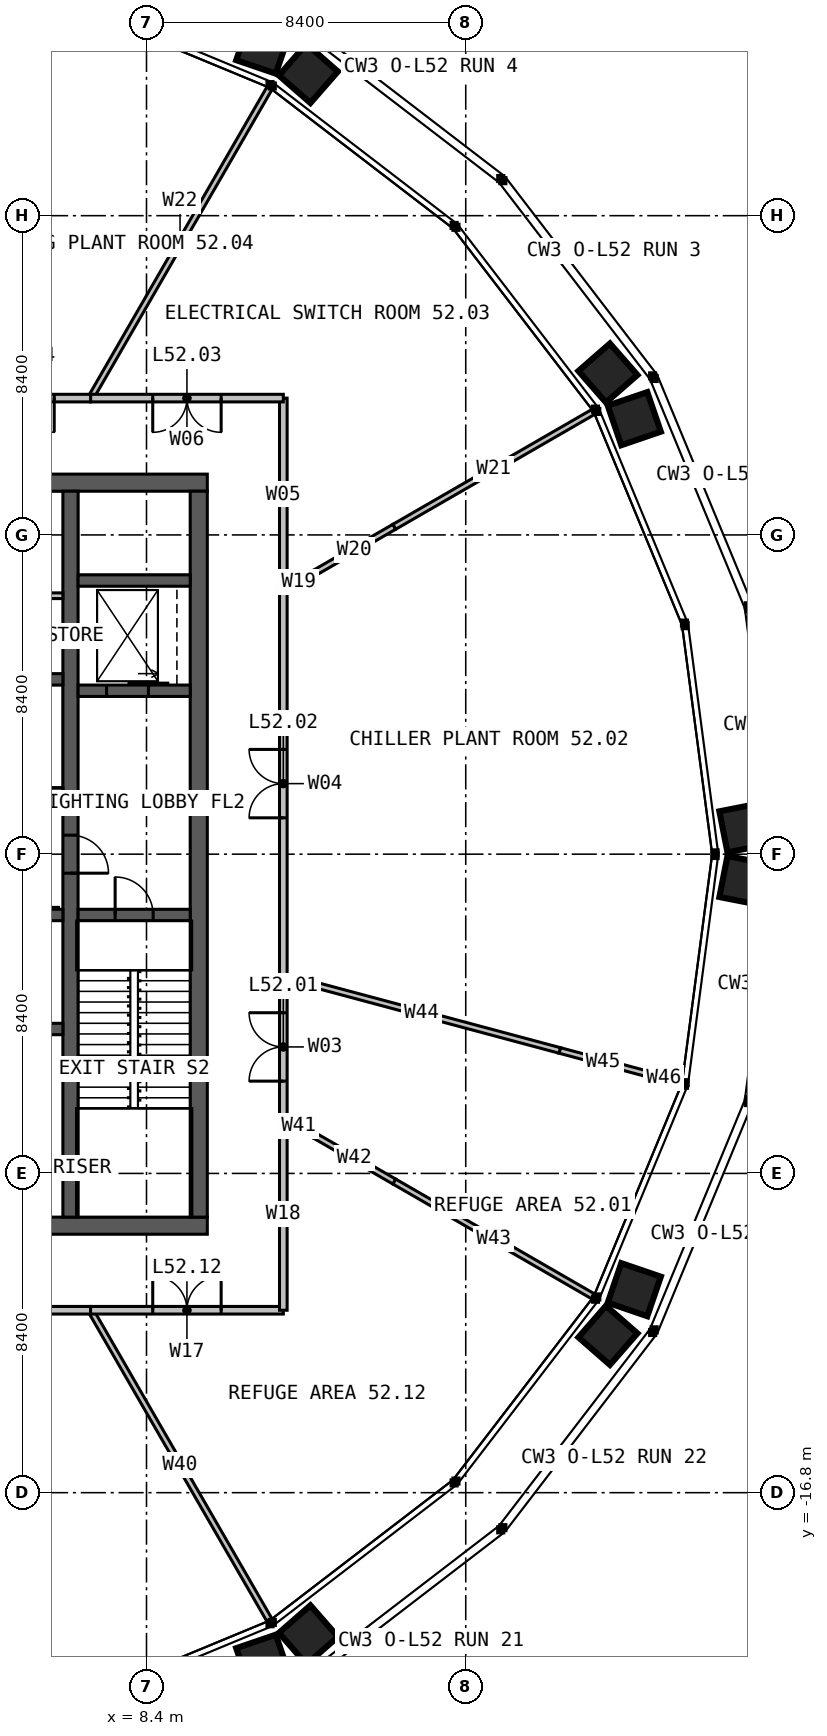
"""IFC4 building model, lengths in metres.
Left out: names, types, materials, properties, quantities, classifications, styles, units other than length and angle.
Written with IfcOpenShell. Run it as: python <this file> out.ifc"""

import sys

from ifc_helpers import new_model, si_unit, direction, frame, frame_2d, origin, place, context, subcontext, project, spatial, rectangle, extrude, element, fill, save


model = new_model("IFC4")
c1 = context("Model", 3, precision=1e-05, world=origin(), true_north=direction((0.0, 1.0)))
c2 = subcontext(c1, "Body", "Model", "MODEL_VIEW")
j1 = project(units=[si_unit("LENGTHUNIT", "METRE"), si_unit("PLANEANGLEUNIT", "RADIAN")], contexts=[c1])
p1 = place(None, origin())
s1 = spatial("IfcSite", under=j1, at=p1, CompositionType="ELEMENT")
p2 = place(p1, origin())
s2 = spatial("IfcBuilding", under=s1, at=p2, CompositionType="ELEMENT")
p3 = place(p2, frame((0.0, 0.0, 215.0)))
s3 = spatial("IfcBuildingStorey", under=s2, at=p3, CompositionType="ELEMENT", Elevation=215.0)
p4 = place(p3, frame((-10.0, 9.775, 0.0), z_axis=(0.0, 0.0, 1.0), x_axis=(1.0, 0.0, 0.0)))
e1 = element("IfcWall", 1, at=p4, inside=s3, PredefinedType="SOLIDWALL", context=c2, shape_type="SweptSolid", body=[
    extrude(rectangle(XDim=20.0, YDim=0.45, at=frame_2d((10.0, 0.0))), origin(), (0.0, 0.0, 1.0), 5.0),
])
p5 = place(p4, frame((9.4, 0.0, 0.0)))
e2 = element("IfcOpeningElement", 2, at=p5, cuts=e1, PredefinedType="OPENING", context=c2, shape_type="SweptSolid", body=[
    extrude(rectangle(XDim=1.2, YDim=2.2, at=frame_2d((0.6, 1.1))), frame((0.0, 0.235, 0.0), z_axis=(0.0, -1.0, 0.0), x_axis=(1.0, 0.0, 0.0)), (0.0, 0.0, 1.0), 0.47),
])
p6 = place(p3, frame((10.0, -9.775, 0.0), z_axis=(0.0, 0.0, 1.0), x_axis=(-1.0, 0.0, 0.0)))
e3 = element("IfcWall", 3, at=p6, inside=s3, PredefinedType="SOLIDWALL", context=c2, shape_type="SweptSolid", body=[
    extrude(rectangle(XDim=20.0, YDim=0.45, at=frame_2d((10.0, 0.0))), origin(), (0.0, 0.0, 1.0), 5.0),
])
p7 = place(p6, frame((6.875, 0.0, 0.0)))
e4 = element("IfcOpeningElement", 4, at=p7, cuts=e3, PredefinedType="OPENING", context=c2, shape_type="SweptSolid", body=[
    extrude(rectangle(XDim=1.2, YDim=2.2, at=frame_2d((0.6, 1.1))), frame((0.0, 0.235, 0.0), z_axis=(0.0, -1.0, 0.0), x_axis=(1.0, 0.0, 0.0)), (0.0, 0.0, 1.0), 0.47),
])
p8 = place(p3, frame((9.775, -9.55, 0.0), z_axis=(0.0, 0.0, 1.0), x_axis=(0.0, 1.0, 0.0)))
e5 = element("IfcWall", 5, at=p8, inside=s3, PredefinedType="SOLIDWALL", context=c2, shape_type="SweptSolid", body=[
    extrude(rectangle(XDim=19.1, YDim=0.45, at=frame_2d((9.55, 0.0))), origin(), (0.0, 0.0, 1.0), 5.0),
])
p9 = place(p3, frame((6.4, 9.55, 0.0), z_axis=(0.0, 0.0, 1.0), x_axis=(0.0, -1.0, 0.0)))
e6 = element("IfcWall", 6, at=p9, inside=s3, PredefinedType="SOLIDWALL", context=c2, shape_type="SweptSolid", body=[
    extrude(rectangle(XDim=19.1, YDim=0.4, at=frame_2d((9.55, 0.0))), origin(), (0.0, 0.0, 1.0), 5.0),
])
p10 = place(p9, frame((9.05, 0.0, 0.0)))
e7 = element("IfcOpeningElement", 7, at=p10, cuts=e6, PredefinedType="OPENING", context=c2, shape_type="SweptSolid", body=[
    extrude(rectangle(XDim=1.0, YDim=2.2, at=frame_2d((0.5, 1.1))), frame((0.0, 0.21, 0.0), z_axis=(0.0, -1.0, 0.0), x_axis=(1.0, 0.0, 0.0)), (0.0, 0.0, 1.0), 0.42),
])
for number, where, z_axis, x_axis in (
    (8, (1.35, 1.6, 0.0), (0.0, 0.0, 1.0), (1.0, 0.0, 0.0)),
    (9, (1.35, 4.6, 0.0), (0.0, 0.0, 1.0), (1.0, 0.0, 0.0)),
):
    element("IfcWall", number, at=place(p3, frame(where, z_axis=z_axis, x_axis=x_axis)), inside=s3, PredefinedType="SOLIDWALL", context=c2, shape_type="SweptSolid", body=[
        extrude(rectangle(XDim=4.85, YDim=0.3, at=frame_2d((2.425, 0.0))), origin(), (0.0, 0.0, 1.0), 5.0),
    ])
p11 = place(p3, frame((3.85, -1.6, 0.0), z_axis=(0.0, 0.0, 1.0), x_axis=(1.0, 0.0, 0.0)))
e10 = element("IfcWall", 10, at=p11, inside=s3, PredefinedType="SOLIDWALL", context=c2, shape_type="SweptSolid", body=[
    extrude(rectangle(XDim=2.35, YDim=0.3, at=frame_2d((1.175, 0.0))), origin(), (0.0, 0.0, 1.0), 5.0),
])
p12 = place(p11, frame((0.625, 0.0, 0.0)))
e11 = element("IfcOpeningElement", 11, at=p12, cuts=e10, PredefinedType="OPENING", context=c2, shape_type="SweptSolid", body=[
    extrude(rectangle(XDim=1.1, YDim=2.2, at=frame_2d((0.55, 1.1))), frame((0.0, 0.16, 0.0), z_axis=(0.0, -1.0, 0.0), x_axis=(1.0, 0.0, 0.0)), (0.0, 0.0, 1.0), 0.32),
])
p13 = place(p3, frame((3.85, -4.6, 0.0), z_axis=(0.0, 0.0, 1.0), x_axis=(1.0, 0.0, 0.0)))
e12 = element("IfcWall", 12, at=p13, inside=s3, PredefinedType="SOLIDWALL", context=c2, shape_type="SweptSolid", body=[
    extrude(rectangle(XDim=2.35, YDim=0.3, at=frame_2d((1.175, 0.0))), origin(), (0.0, 0.0, 1.0), 5.0),
])
p14 = place(p3, frame((6.6, -1.6, 0.0), z_axis=(0.0, 0.0, 1.0), x_axis=(1.0, 0.0, 0.0)))
e13 = element("IfcWall", 13, at=p14, inside=s3, PredefinedType="SOLIDWALL", context=c2, shape_type="SweptSolid", body=[
    extrude(rectangle(XDim=2.95, YDim=0.3, at=frame_2d((1.475, 0.0))), origin(), (0.0, 0.0, 1.0), 5.0),
])
p15 = place(p14, frame((0.975, 0.0, 0.0)))
e14 = element("IfcOpeningElement", 14, at=p15, cuts=e13, PredefinedType="OPENING", context=c2, shape_type="SweptSolid", body=[
    extrude(rectangle(XDim=1.0, YDim=2.2, at=frame_2d((0.5, 1.1))), frame((0.0, 0.16, 0.0), z_axis=(0.0, -1.0, 0.0), x_axis=(1.0, 0.0, 0.0)), (0.0, 0.0, 1.0), 0.32),
])
p16 = place(p3, frame((6.6, 4.3, 0.0), z_axis=(0.0, 0.0, 1.0), x_axis=(1.0, 0.0, 0.0)))
e15 = element("IfcWall", 15, at=p16, inside=s3, PredefinedType="SOLIDWALL", context=c2, shape_type="SweptSolid", body=[
    extrude(rectangle(XDim=2.95, YDim=0.3, at=frame_2d((1.475, 0.0))), origin(), (0.0, 0.0, 1.0), 5.0),
])
p17 = place(p16, frame((0.75, 0.0, 0.0)))
e16 = element("IfcOpeningElement", 16, at=p17, cuts=e15, PredefinedType="OPENING", context=c2, shape_type="SweptSolid", body=[
    extrude(rectangle(XDim=1.1, YDim=2.2, at=frame_2d((0.55, 1.1))), frame((0.0, 0.16, 0.0), z_axis=(0.0, -1.0, 0.0), x_axis=(1.0, 0.0, 0.0)), (0.0, 0.0, 1.0), 0.32),
])
p18 = place(p3, frame((6.6, 7.2, 0.0), z_axis=(0.0, 0.0, 1.0), x_axis=(1.0, 0.0, 0.0)))
e17 = element("IfcWall", 17, at=p18, inside=s3, PredefinedType="SOLIDWALL", context=c2, shape_type="SweptSolid", body=[
    extrude(rectangle(XDim=2.95, YDim=0.3, at=frame_2d((1.475, 0.0))), origin(), (0.0, 0.0, 1.0), 5.0),
])
p19 = place(p3, frame((1.35, 6.8, 0.0), z_axis=(0.0, 0.0, 1.0), x_axis=(1.0, 0.0, 0.0)))
e18 = element("IfcWall", 18, at=p19, inside=s3, PredefinedType="PARTITIONING", context=c2, shape_type="SweptSolid", body=[
    extrude(rectangle(XDim=4.85, YDim=0.15, at=frame_2d((2.425, 0.0))), origin(), (0.0, 0.0, 1.0), 4.75),
])
p20 = place(p19, frame((3.15, 0.0, 0.0)))
e19 = element("IfcOpeningElement", 19, at=p20, cuts=e18, PredefinedType="OPENING", context=c2, shape_type="SweptSolid", body=[
    extrude(rectangle(XDim=0.9, YDim=2.2, at=frame_2d((0.45, 1.1))), frame((0.0, 0.085, 0.0), z_axis=(0.0, -1.0, 0.0), x_axis=(1.0, 0.0, 0.0)), (0.0, 0.0, 1.0), 0.17),
])
p21 = place(p3, frame((12.0, -6.928, 0.0), z_axis=(0.0, 0.0, 1.0), x_axis=(0.866042712228, -0.499970019698, 0.0)))
e20 = element("IfcWall", 20, at=p21, inside=s3, PredefinedType="PARTITIONING", context=c2, shape_type="SweptSolid", body=[
    extrude(rectangle(XDim=0.939, YDim=0.15, at=frame_2d((0.469, 0.0))), origin(), (0.0, 0.0, 1.0), 4.8),
])
p22 = place(p3, frame((12.813, -7.398, 0.0), z_axis=(0.0, 0.0, 1.0), x_axis=(0.86601855109, -0.500011869027, 0.0)))
e21 = element("IfcWall", 21, at=p22, inside=s3, PredefinedType="PARTITIONING", context=c2, shape_type="SweptSolid", body=[
    extrude(rectangle(XDim=2.434, YDim=0.15, at=frame_2d((1.217, 0.0))), origin(), (0.0, 0.0, 1.0), 3.79),
])
p23 = place(p3, frame((14.921, -8.615, 0.0), z_axis=(0.0, 0.0, 1.0), x_axis=(0.866017437, -0.500013798622, 0.0)))
e22 = element("IfcWall", 22, at=p23, inside=s3, PredefinedType="PARTITIONING", context=c2, shape_type="SweptSolid", body=[
    extrude(rectangle(XDim=6.045, YDim=0.15, at=frame_2d((3.022, 0.0))), origin(), (0.0, 0.0, 1.0), 4.8),
])
p24 = place(p3, frame((12.0, -3.215, 0.0), z_axis=(0.0, 0.0, 1.0), x_axis=(0.965923894696, -0.258826253797, 0.0)))
e23 = element("IfcWall", 23, at=p24, inside=s3, PredefinedType="PARTITIONING", context=c2, shape_type="SweptSolid", body=[
    extrude(rectangle(XDim=7.534, YDim=0.15, at=frame_2d((3.767, 0.0))), origin(), (0.0, 0.0, 1.0), 4.8),
])
p25 = place(p3, frame((19.277, -5.165, 0.0), z_axis=(0.0, 0.0, 1.0), x_axis=(0.965936478183, -0.258779288421, 0.0)))
e24 = element("IfcWall", 24, at=p25, inside=s3, PredefinedType="PARTITIONING", context=c2, shape_type="SweptSolid", body=[
    extrude(rectangle(XDim=2.354, YDim=0.15, at=frame_2d((1.177, 0.0))), origin(), (0.0, 0.0, 1.0), 3.79),
])
p26 = place(p3, frame((21.551, -5.774, 0.0), z_axis=(0.0, 0.0, 1.0), x_axis=(0.965872225937, -0.25901900155, 0.0)))
e25 = element("IfcWall", 25, at=p26, inside=s3, PredefinedType="PARTITIONING", context=c2, shape_type="SweptSolid", body=[
    extrude(rectangle(XDim=0.963, YDim=0.15, at=frame_2d((0.482, 0.0))), origin(), (0.0, 0.0, 1.0), 4.8),
])
p27 = place(p3, frame((12.0, 6.928, 0.0), z_axis=(0.0, 0.0, 1.0), x_axis=(0.866042712228, 0.499970019698, 0.0)))
e26 = element("IfcWall", 26, at=p27, inside=s3, PredefinedType="PARTITIONING", context=c2, shape_type="SweptSolid", body=[
    extrude(rectangle(XDim=0.939, YDim=0.15, at=frame_2d((0.469, 0.0))), origin(), (0.0, 0.0, 1.0), 4.8),
])
p28 = place(p3, frame((12.813, 7.398, 0.0), z_axis=(0.0, 0.0, 1.0), x_axis=(0.86601855109, 0.500011869027, 0.0)))
e27 = element("IfcWall", 27, at=p28, inside=s3, PredefinedType="PARTITIONING", context=c2, shape_type="SweptSolid", body=[
    extrude(rectangle(XDim=2.434, YDim=0.15, at=frame_2d((1.217, 0.0))), origin(), (0.0, 0.0, 1.0), 3.79),
])
p29 = place(p3, frame((14.921, 8.615, 0.0), z_axis=(0.0, 0.0, 1.0), x_axis=(0.866017437, 0.500013798622, 0.0)))
e28 = element("IfcWall", 28, at=p29, inside=s3, PredefinedType="PARTITIONING", context=c2, shape_type="SweptSolid", body=[
    extrude(rectangle(XDim=6.045, YDim=0.15, at=frame_2d((3.022, 0.0))), origin(), (0.0, 0.0, 1.0), 4.8),
])
for number, where, z_axis, x_axis in (
    (29, (6.928, 12.0, 0.0), (0.0, 0.0, 1.0), (0.5, 0.866, 0.0)),
    (30, (6.928, -12.0, 0.0), (0.0, 0.0, 1.0), (0.5, -0.866, 0.0)),
):
    element("IfcWall", number, at=place(p3, frame(where, z_axis=z_axis, x_axis=x_axis)), inside=s3, PredefinedType="PARTITIONING", context=c2, shape_type="SweptSolid", body=[
        extrude(rectangle(XDim=9.418, YDim=0.15, at=frame_2d((4.709, 0.0))), origin(), (0.0, 0.0, 1.0), 4.8),
    ])
p30 = place(p3, frame((12.0, -6.928, 0.0), z_axis=(0.0, 0.0, 1.0), x_axis=(0.0, 1.0, 0.0)))
e31 = element("IfcWall", 31, at=p30, inside=s3, PredefinedType="PARTITIONING", context=c2, shape_type="SweptSolid", body=[
    extrude(rectangle(XDim=3.713, YDim=0.2, at=frame_2d((1.856, 0.0))), origin(), (0.0, 0.0, 1.0), 4.8),
])
p31 = place(p30, frame((0.956, 0.0, 0.0)))
e32 = element("IfcOpeningElement", 32, at=p31, cuts=e31, PredefinedType="OPENING", context=c2, shape_type="SweptSolid", body=[
    extrude(rectangle(XDim=1.8, YDim=2.2, at=frame_2d((0.9, 1.1))), frame((0.0, 0.11, 0.0), z_axis=(0.0, -1.0, 0.0), x_axis=(1.0, 0.0, 0.0)), (0.0, 0.0, 1.0), 0.22),
])
p32 = place(p3, frame((12.0, -3.215, 0.0), z_axis=(0.0, 0.0, 1.0), x_axis=(0.0, 1.0, 0.0)))
e33 = element("IfcWall", 33, at=p32, inside=s3, PredefinedType="PARTITIONING", context=c2, shape_type="SweptSolid", body=[
    extrude(rectangle(XDim=10.144, YDim=0.2, at=frame_2d((5.072, 0.0))), origin(), (0.0, 0.0, 1.0), 4.8),
])
p33 = place(p32, frame((4.172, 0.0, 0.0)))
e34 = element("IfcOpeningElement", 34, at=p33, cuts=e33, PredefinedType="OPENING", context=c2, shape_type="SweptSolid", body=[
    extrude(rectangle(XDim=1.8, YDim=2.2, at=frame_2d((0.9, 1.1))), frame((0.0, 0.11, 0.0), z_axis=(0.0, -1.0, 0.0), x_axis=(1.0, 0.0, 0.0)), (0.0, 0.0, 1.0), 0.22),
])
p34 = place(p3, frame((12.0, 6.928, 0.0), z_axis=(0.0, 0.0, 1.0), x_axis=(0.0, 1.0, 0.0)))
e35 = element("IfcWall", 35, at=p34, inside=s3, PredefinedType="PARTITIONING", context=c2, shape_type="SweptSolid", body=[
    extrude(rectangle(XDim=5.072, YDim=0.2, at=frame_2d((2.536, 0.0))), origin(), (0.0, 0.0, 1.0), 4.8),
])
p35 = place(p3, frame((12.0, 12.0, 0.0), z_axis=(0.0, 0.0, 1.0), x_axis=(-1.0, 0.0, 0.0)))
e36 = element("IfcWall", 36, at=p35, inside=s3, PredefinedType="PARTITIONING", context=c2, shape_type="SweptSolid", body=[
    extrude(rectangle(XDim=5.072, YDim=0.2, at=frame_2d((2.536, 0.0))), origin(), (0.0, 0.0, 1.0), 4.8),
])
p36 = place(p35, frame((1.636, 0.0, 0.0)))
e37 = element("IfcOpeningElement", 37, at=p36, cuts=e36, PredefinedType="OPENING", context=c2, shape_type="SweptSolid", body=[
    extrude(rectangle(XDim=1.8, YDim=2.2, at=frame_2d((0.9, 1.1))), frame((0.0, 0.11, 0.0), z_axis=(0.0, -1.0, 0.0), x_axis=(1.0, 0.0, 0.0)), (0.0, 0.0, 1.0), 0.22),
])
p37 = place(p3, frame((6.928, 12.0, 0.0), z_axis=(0.0, 0.0, 1.0), x_axis=(-1.0, 0.0, 0.0)))
e38 = element("IfcWall", 38, at=p37, inside=s3, PredefinedType="PARTITIONING", context=c2, shape_type="SweptSolid", body=[
    extrude(rectangle(XDim=3.713, YDim=0.2, at=frame_2d((1.856, 0.0))), origin(), (0.0, 0.0, 1.0), 4.8),
])
p38 = place(p37, frame((0.956, 0.0, 0.0)))
e39 = element("IfcOpeningElement", 39, at=p38, cuts=e38, PredefinedType="OPENING", context=c2, shape_type="SweptSolid", body=[
    extrude(rectangle(XDim=1.8, YDim=2.2, at=frame_2d((0.9, 1.1))), frame((0.0, 0.11, 0.0), z_axis=(0.0, -1.0, 0.0), x_axis=(1.0, 0.0, 0.0)), (0.0, 0.0, 1.0), 0.22),
])
p39 = place(p3, frame((-3.215, -12.0, 0.0), z_axis=(0.0, 0.0, 1.0), x_axis=(1.0, 0.0, 0.0)))
e40 = element("IfcWall", 40, at=p39, inside=s3, PredefinedType="PARTITIONING", context=c2, shape_type="SweptSolid", body=[
    extrude(rectangle(XDim=10.144, YDim=0.2, at=frame_2d((5.072, 0.0))), origin(), (0.0, 0.0, 1.0), 4.8),
])
p40 = place(p39, frame((4.172, 0.0, 0.0)))
e41 = element("IfcOpeningElement", 41, at=p40, cuts=e40, PredefinedType="OPENING", context=c2, shape_type="SweptSolid", body=[
    extrude(rectangle(XDim=1.8, YDim=2.2, at=frame_2d((0.9, 1.1))), frame((0.0, 0.11, 0.0), z_axis=(0.0, -1.0, 0.0), x_axis=(1.0, 0.0, 0.0)), (0.0, 0.0, 1.0), 0.22),
])
p41 = place(p3, frame((6.928, -12.0, 0.0), z_axis=(0.0, 0.0, 1.0), x_axis=(1.0, 0.0, 0.0)))
e42 = element("IfcWall", 42, at=p41, inside=s3, PredefinedType="PARTITIONING", context=c2, shape_type="SweptSolid", body=[
    extrude(rectangle(XDim=5.072, YDim=0.2, at=frame_2d((2.536, 0.0))), origin(), (0.0, 0.0, 1.0), 4.8),
])
p42 = place(p41, frame((1.636, 0.0, 0.0)))
e43 = element("IfcOpeningElement", 43, at=p42, cuts=e42, PredefinedType="OPENING", context=c2, shape_type="SweptSolid", body=[
    extrude(rectangle(XDim=1.8, YDim=2.2, at=frame_2d((0.9, 1.1))), frame((0.0, 0.11, 0.0), z_axis=(0.0, -1.0, 0.0), x_axis=(1.0, 0.0, 0.0)), (0.0, 0.0, 1.0), 0.22),
])
p43 = place(p3, frame((12.0, -12.0, 0.0), z_axis=(0.0, 0.0, 1.0), x_axis=(0.0, 1.0, 0.0)))
e44 = element("IfcWall", 44, at=p43, inside=s3, PredefinedType="PARTITIONING", context=c2, shape_type="SweptSolid", body=[
    extrude(rectangle(XDim=5.072, YDim=0.2, at=frame_2d((2.536, 0.0))), origin(), (0.0, 0.0, 1.0), 4.8),
])
p44 = place(p10, origin())
e45 = element("IfcDoor", 45, at=p44, inside=s3, OperationType="SINGLE_SWING_RIGHT", PredefinedType="DOOR", context=c2, shape_type="SweptSolid", body=[
    extrude(rectangle(XDim=1.0, YDim=2.2, at=frame_2d((0.5, 1.1))), frame((0.0, 0.025, 0.0), z_axis=(0.0, -1.0, 0.0), x_axis=(1.0, 0.0, 0.0)), (0.0, 0.0, 1.0), 0.05),
])
fill(e7, e45)
p45 = place(p15, origin())
e46 = element("IfcDoor", 46, at=p45, inside=s3, OperationType="SINGLE_SWING_LEFT", PredefinedType="DOOR", context=c2, shape_type="SweptSolid", body=[
    extrude(rectangle(XDim=1.0, YDim=2.2, at=frame_2d((0.5, 1.1))), frame((0.0, 0.025, 0.0), z_axis=(0.0, -1.0, 0.0), x_axis=(1.0, 0.0, 0.0)), (0.0, 0.0, 1.0), 0.05),
])
fill(e14, e46)
p46 = place(p17, origin())
e47 = element("IfcDoor", 47, at=p46, inside=s3, OperationType="SLIDING_TO_LEFT", PredefinedType="DOOR", context=c2, shape_type="SweptSolid", body=[
    extrude(rectangle(XDim=1.1, YDim=2.2, at=frame_2d((0.55, 1.1))), frame((0.0, 0.025, 0.0), z_axis=(0.0, -1.0, 0.0), x_axis=(1.0, 0.0, 0.0)), (0.0, 0.0, 1.0), 0.05),
])
fill(e16, e47)
p47 = place(p31, origin())
e48 = element("IfcDoor", 48, at=p47, inside=s3, OperationType="DOUBLE_DOOR_SINGLE_SWING", PredefinedType="DOOR", context=c2, shape_type="SweptSolid", body=[
    extrude(rectangle(XDim=1.8, YDim=2.2, at=frame_2d((0.9, 1.1))), frame((0.0, 0.025, 0.0), z_axis=(0.0, -1.0, 0.0), x_axis=(1.0, 0.0, 0.0)), (0.0, 0.0, 1.0), 0.05),
])
fill(e32, e48)
p48 = place(p33, origin())
e49 = element("IfcDoor", 49, at=p48, inside=s3, OperationType="DOUBLE_DOOR_SINGLE_SWING", PredefinedType="DOOR", context=c2, shape_type="SweptSolid", body=[
    extrude(rectangle(XDim=1.8, YDim=2.2, at=frame_2d((0.9, 1.1))), frame((0.0, 0.025, 0.0), z_axis=(0.0, -1.0, 0.0), x_axis=(1.0, 0.0, 0.0)), (0.0, 0.0, 1.0), 0.05),
])
fill(e34, e49)
p49 = place(p36, origin())
e50 = element("IfcDoor", 50, at=p49, inside=s3, OperationType="DOUBLE_DOOR_SINGLE_SWING", PredefinedType="DOOR", context=c2, shape_type="SweptSolid", body=[
    extrude(rectangle(XDim=1.8, YDim=2.2, at=frame_2d((0.9, 1.1))), frame((0.0, 0.025, 0.0), z_axis=(0.0, -1.0, 0.0), x_axis=(1.0, 0.0, 0.0)), (0.0, 0.0, 1.0), 0.05),
])
fill(e37, e50)
p50 = place(p38, origin())
e51 = element("IfcDoor", 51, at=p50, inside=s3, OperationType="DOUBLE_DOOR_SINGLE_SWING", PredefinedType="DOOR", context=c2, shape_type="SweptSolid", body=[
    extrude(rectangle(XDim=1.8, YDim=2.2, at=frame_2d((0.9, 1.1))), frame((0.0, 0.025, 0.0), z_axis=(0.0, -1.0, 0.0), x_axis=(1.0, 0.0, 0.0)), (0.0, 0.0, 1.0), 0.05),
])
fill(e39, e51)
p51 = place(p42, origin())
e52 = element("IfcDoor", 52, at=p51, inside=s3, OperationType="DOUBLE_DOOR_SINGLE_SWING", PredefinedType="DOOR", context=c2, shape_type="SweptSolid", body=[
    extrude(rectangle(XDim=1.8, YDim=2.2, at=frame_2d((0.9, 1.1))), frame((0.0, 0.025, 0.0), z_axis=(0.0, -1.0, 0.0), x_axis=(1.0, 0.0, 0.0)), (0.0, 0.0, 1.0), 0.05),
])
fill(e43, e52)
save(model, sys.argv[1])
